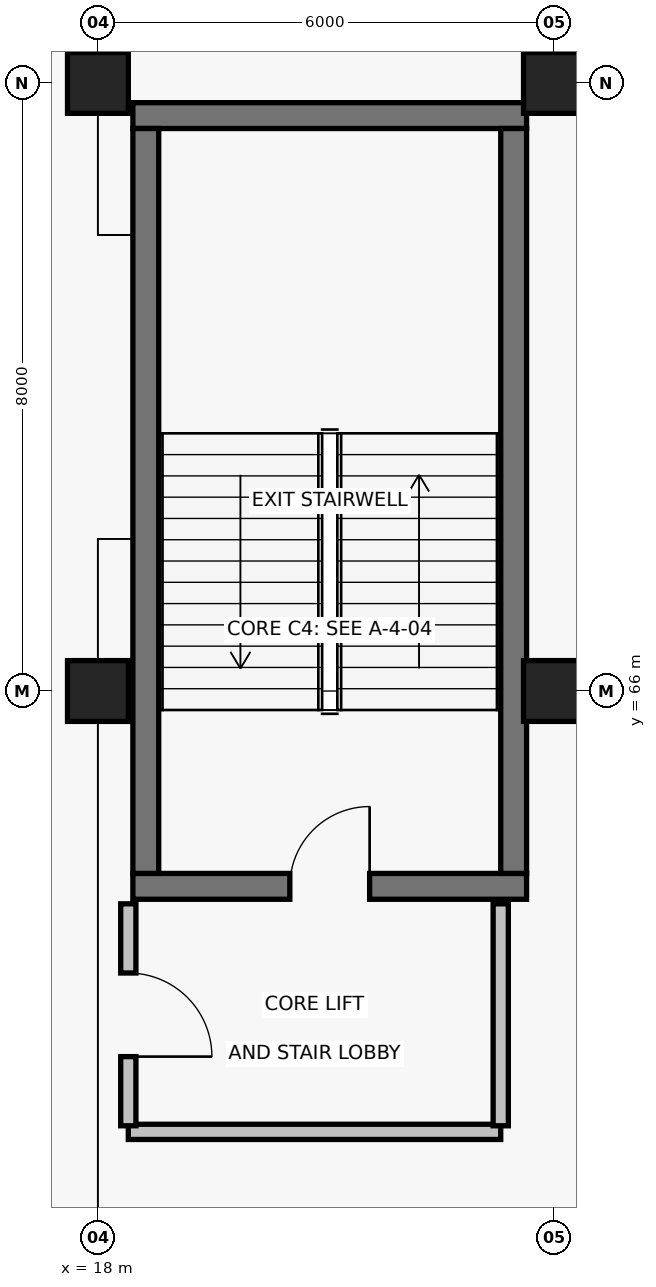
"""IFC4 building model, lengths in metres.
Left out: names, types, materials, properties, quantities, classifications, styles, units other than length and angle.
Written with IfcOpenShell. Run it as: python <this file> out.ifc"""

import sys

from ifc_helpers import new_model, si_unit, direction, frame, frame_2d, origin, origin_2d, place, context, subcontext, project, spatial, rectangle, extrude, element, fill, save


model = new_model("IFC4")
c1 = context("Model", 3, precision=1e-05, world=origin(), true_north=direction((0.0, 1.0)))
c2 = subcontext(c1, "Body", "Model", "MODEL_VIEW")
j1 = project(units=[si_unit("LENGTHUNIT", "METRE"), si_unit("PLANEANGLEUNIT", "RADIAN")], contexts=[c1])
p1 = place(None, origin())
s1 = spatial("IfcSite", under=j1, at=p1, CompositionType="ELEMENT")
p2 = place(p1, origin())
s2 = spatial("IfcBuilding", under=s1, at=p2, CompositionType="ELEMENT")
p3 = place(p2, frame((0.0, 0.0, -4.8)))
s3 = spatial("IfcBuildingStorey", under=s2, at=p3, CompositionType="ELEMENT", Elevation=-4.8)
for number, where, z_axis, x_axis in (
    (1, (18.0, 66.0, 0.0), (0.0, 0.0, 1.0), (1.0, 0.0, 0.0)),
    (2, (18.0, 74.0, 0.0), (0.0, 0.0, 1.0), (1.0, 0.0, 0.0)),
    (3, (24.0, 66.0, 0.0), (0.0, 0.0, 1.0), (1.0, 0.0, 0.0)),
    (4, (24.0, 74.0, 0.0), (0.0, 0.0, 1.0), (1.0, 0.0, 0.0)),
):
    element("IfcColumn", number, at=place(p3, frame(where, z_axis=z_axis, x_axis=x_axis)), inside=s3, PredefinedType="COLUMN", context=c2, shape_type="SweptSolid", body=[
        extrude(rectangle(XDim=0.8, YDim=0.8, at=origin_2d()), origin(), (0.0, 0.0, 1.0), 4.8),
    ])
p4 = place(p3, frame((18.46, 63.43, 0.0), z_axis=(0.0, 0.0, 1.0), x_axis=(1.0, 0.0, 0.0)))
e5 = element("IfcWall", 5, at=p4, inside=s3, PredefinedType="SHEAR", context=c2, shape_type="SweptSolid", body=[
    extrude(rectangle(XDim=5.18, YDim=0.34, at=frame_2d((2.59, 0.0))), origin(), (0.0, 0.0, 1.0), 4.4),
])
p5 = place(p4, frame((2.065, 0.0, 0.0)))
e6 = element("IfcOpeningElement", 6, at=p5, cuts=e5, PredefinedType="OPENING", context=c2, shape_type="SweptSolid", body=[
    extrude(rectangle(XDim=1.05, YDim=2.15, at=frame_2d((0.525, 1.075))), frame((0.0, 0.185, 0.0), z_axis=(0.0, -1.0, 0.0), x_axis=(1.0, 0.0, 0.0)), (0.0, 0.0, 1.0), 0.37),
])
p6 = place(p3, frame((23.64, 73.57, 0.0), z_axis=(0.0, 0.0, 1.0), x_axis=(-1.0, 0.0, 0.0)))
e7 = element("IfcWall", 7, at=p6, inside=s3, PredefinedType="SHEAR", context=c2, shape_type="SweptSolid", body=[
    extrude(rectangle(XDim=5.18, YDim=0.34, at=frame_2d((2.59, 0.0))), origin(), (0.0, 0.0, 1.0), 4.4),
])
for number, where, z_axis, x_axis in (
    (8, (18.63, 73.4, 0.0), (0.0, 0.0, 1.0), (0.0, -1.0, 0.0)),
    (9, (23.47, 63.6, 0.0), (0.0, 0.0, 1.0), (0.0, 1.0, 0.0)),
):
    element("IfcWall", number, at=place(p3, frame(where, z_axis=z_axis, x_axis=x_axis)), inside=s3, PredefinedType="SHEAR", context=c2, shape_type="SweptSolid", body=[
        extrude(rectangle(XDim=9.8, YDim=0.34, at=frame_2d((4.9, 0.0))), origin(), (0.0, 0.0, 1.0), 4.4),
    ])
p7 = place(p3, frame((18.4, 60.2, 0.0), z_axis=(0.0, 0.0, 1.0), x_axis=(1.0, 0.0, 0.0)))
e10 = element("IfcWall", 10, at=p7, inside=s3, PredefinedType="PARTITIONING", context=c2, shape_type="SweptSolid", body=[
    extrude(rectangle(XDim=4.9, YDim=0.2, at=frame_2d((2.45, 0.0))), origin(), (0.0, 0.0, 1.0), 3.587),
])
p8 = place(p3, frame((18.4, 63.2, 0.0), z_axis=(0.0, 0.0, 1.0), x_axis=(0.0, -1.0, 0.0)))
e11 = element("IfcWall", 11, at=p8, inside=s3, PredefinedType="PARTITIONING", context=c2, shape_type="SweptSolid", body=[
    extrude(rectangle(XDim=2.92, YDim=0.2, at=frame_2d((1.46, 0.0))), origin(), (0.0, 0.0, 1.0), 3.587),
])
p9 = place(p8, frame((0.91, 0.0, 0.0)))
e12 = element("IfcOpeningElement", 12, at=p9, cuts=e11, PredefinedType="OPENING", context=c2, shape_type="SweptSolid", body=[
    extrude(rectangle(XDim=1.1, YDim=2.15, at=frame_2d((0.55, 1.075))), frame((0.0, 0.115, 0.0), z_axis=(0.0, -1.0, 0.0), x_axis=(1.0, 0.0, 0.0)), (0.0, 0.0, 1.0), 0.23),
])
p10 = place(p3, frame((23.3, 60.28, 0.0), z_axis=(0.0, 0.0, 1.0), x_axis=(0.0, 1.0, 0.0)))
e13 = element("IfcWall", 13, at=p10, inside=s3, PredefinedType="PARTITIONING", context=c2, shape_type="SweptSolid", body=[
    extrude(rectangle(XDim=2.92, YDim=0.2, at=frame_2d((1.46, 0.0))), origin(), (0.0, 0.0, 1.0), 4.4),
])
p11 = place(p5, origin())
e14 = element("IfcDoor", 14, at=p11, inside=s3, OperationType="SINGLE_SWING_RIGHT", PredefinedType="DOOR", context=c2, shape_type="SweptSolid", body=[
    extrude(rectangle(XDim=1.05, YDim=2.15, at=frame_2d((0.525, 1.075))), frame((0.0, 0.025, 0.0), z_axis=(0.0, -1.0, 0.0), x_axis=(1.0, 0.0, 0.0)), (0.0, 0.0, 1.0), 0.05),
])
fill(e6, e14)
p12 = place(p9, origin())
e15 = element("IfcDoor", 15, at=p12, inside=s3, OperationType="SINGLE_SWING_RIGHT", PredefinedType="DOOR", context=c2, shape_type="SweptSolid", body=[
    extrude(rectangle(XDim=1.1, YDim=2.15, at=frame_2d((0.55, 1.075))), frame((0.0, 0.025, 0.0), z_axis=(0.0, -1.0, 0.0), x_axis=(1.0, 0.0, 0.0)), (0.0, 0.0, 1.0), 0.05),
])
fill(e12, e15)
save(model, sys.argv[1])
